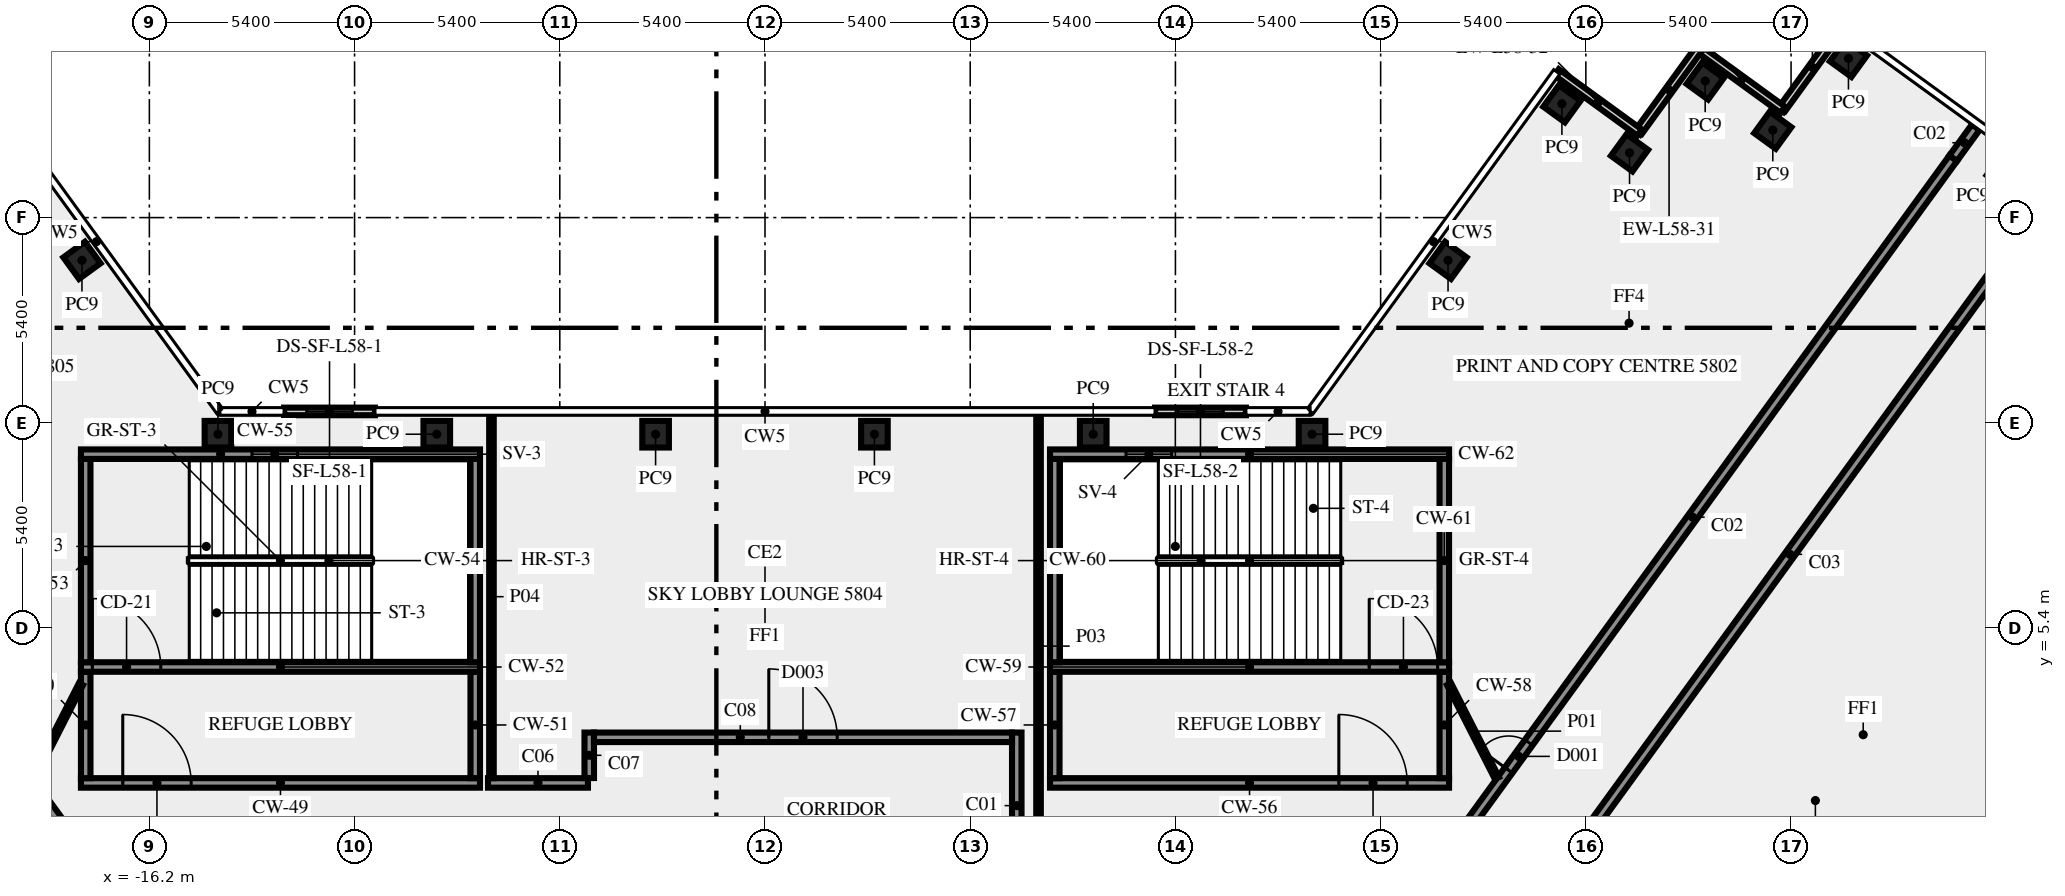
"""IFC4 building model, lengths in metres.
Left out: names, types, materials, properties, quantities, classifications, styles, units other than length and angle.
Written with IfcOpenShell. Run it as: python <this file> out.ifc"""

import sys

from ifc_helpers import new_model, si_unit, direction, frame, frame_2d, origin, origin_2d, place, context, subcontext, project, spatial, rectangle, extrude, element, fill, save


model = new_model("IFC4")
c1 = context("Model", 3, precision=1e-05, world=origin(), true_north=direction((0.0, 1.0)))
c2 = subcontext(c1, "Body", "Model", "MODEL_VIEW")
j1 = project(units=[si_unit("LENGTHUNIT", "METRE"), si_unit("PLANEANGLEUNIT", "RADIAN")], contexts=[c1])
p1 = place(None, origin())
s1 = spatial("IfcSite", under=j1, at=p1, CompositionType="ELEMENT")
p2 = place(p1, origin())
s2 = spatial("IfcBuilding", under=s1, at=p2, CompositionType="ELEMENT")
p3 = place(p2, frame((0.0, 0.0, 248.0)))
s3 = spatial("IfcBuildingStorey", under=s2, at=p3, CompositionType="ELEMENT", Elevation=248.0)
for number, where, z_axis, x_axis in (
    (1, (-17.974, 15.075, 0.0), (0.0, 0.0, 1.0), (-0.588, 0.809, 0.0)),
    (2, (28.51, 20.39, 0.0), (0.0, 0.0, 1.0), (-0.588, -0.809, 0.0)),
    (3, (26.519, 18.5, 0.0), (0.0, 0.0, 1.0), (-0.809, 0.588, 0.0)),
    (4, (24.74, 19.795, 0.0), (0.0, 0.0, 1.0), (-0.588, -0.809, 0.0)),
    (5, (22.749, 17.904, 0.0), (0.0, 0.0, 1.0), (-0.588, -0.809, 0.0)),
    (6, (20.97, 19.195, 0.0), (0.0, 0.0, 1.0), (-0.588, -0.809, 0.0)),
    (7, (17.974, 15.075, 0.0), (0.0, 0.0, 1.0), (-0.588, -0.809, 0.0)),
    (8, (14.395, 10.5, 0.0), (0.0, 0.0, 1.0), (-1.0, 0.0, 0.0)),
    (9, (8.637, 10.5, 0.0), (0.0, 0.0, 1.0), (-1.0, 0.0, 0.0)),
    (10, (2.879, 10.5, 0.0), (0.0, 0.0, 1.0), (-1.0, 0.0, 0.0)),
    (11, (-2.879, 10.5, 0.0), (0.0, 0.0, 1.0), (-1.0, 0.0, 0.0)),
    (12, (-8.637, 10.5, 0.0), (0.0, 0.0, 1.0), (-1.0, 0.0, 0.0)),
    (13, (-14.395, 10.5, 0.0), (0.0, 0.0, 1.0), (-1.0, 0.0, 0.0)),
):
    element("IfcColumn", number, at=place(p3, frame(where, z_axis=z_axis, x_axis=x_axis)), inside=s3, PredefinedType="COLUMN", context=c2, shape_type="SweptSolid", body=[
        extrude(rectangle(XDim=0.7, YDim=0.7, at=origin_2d()), origin(), (0.0, 0.0, 1.0), 4.65),
    ])
for number, where, z_axis, x_axis in (
    (14, (28.354, 21.247, 0.0), (0.0, 0.0, 1.0), (-0.588, -0.809, 0.0)),
    (15, (26.785, 19.036, 0.0), (0.0, 0.0, 1.0), (-0.809, 0.588, 0.0)),
):
    element("IfcWall", number, at=place(p3, frame(where, z_axis=z_axis, x_axis=x_axis)), inside=s3, PredefinedType="SOLIDWALL", context=c2, shape_type="SweptSolid", body=[
        extrude(rectangle(XDim=2.7, YDim=0.2, at=frame_2d((1.35, 0.0))), origin(), (0.0, 0.0, 1.0), 4.65),
    ])
for number, where, z_axis, x_axis in (
    (16, (24.583, 20.65, 0.0), (0.0, 0.0, 1.0), (-0.588, -0.809, 0.0)),
    (17, (23.013, 18.438, 0.0), (0.0, 0.0, 1.0), (-0.809, 0.588, 0.0)),
):
    element("IfcWall", number, at=place(p3, frame(where, z_axis=z_axis, x_axis=x_axis)), inside=s3, PredefinedType="SOLIDWALL", context=c2, shape_type="SweptSolid", body=[
        extrude(rectangle(XDim=2.7, YDim=0.2, at=frame_2d((1.35, 0.0))), origin(), (0.0, 0.0, 1.0), 4.65),
    ])
p4 = place(p3, frame((12.655, 11.1, 0.0), z_axis=(0.0, 0.0, 1.0), x_axis=(-1.0, 0.0, 0.0)))
e18 = element("IfcWall", 18, at=p4, inside=s3, PredefinedType="SOLIDWALL", context=c2, shape_type="SweptSolid", body=[
    extrude(rectangle(XDim=2.392, YDim=0.2, at=frame_2d((1.196, 0.0))), origin(), (0.0, 0.0, 1.0), 4.65),
])
p5 = place(p4, frame((0.596, 0.0, 1.0)))
e19 = element("IfcOpeningElement", 19, at=p5, cuts=e18, PredefinedType="OPENING", context=c2, shape_type="SweptSolid", body=[
    extrude(rectangle(XDim=1.2, YDim=1.2, at=frame_2d((0.6, 0.6))), frame((0.0, 0.11, 0.0), z_axis=(0.0, -1.0, 0.0), x_axis=(1.0, 0.0, 0.0)), (0.0, 0.0, 1.0), 0.22),
])
p6 = place(p3, frame((-10.263, 11.1, 0.0), z_axis=(0.0, 0.0, 1.0), x_axis=(-1.0, 0.0, 0.0)))
e20 = element("IfcWall", 20, at=p6, inside=s3, PredefinedType="SOLIDWALL", context=c2, shape_type="SweptSolid", body=[
    extrude(rectangle(XDim=2.392, YDim=0.2, at=frame_2d((1.196, 0.0))), origin(), (0.0, 0.0, 1.0), 4.65),
])
p7 = place(p6, frame((0.596, 0.0, 1.0)))
e21 = element("IfcOpeningElement", 21, at=p7, cuts=e20, PredefinedType="OPENING", context=c2, shape_type="SweptSolid", body=[
    extrude(rectangle(XDim=1.2, YDim=1.2, at=frame_2d((0.6, 0.6))), frame((0.0, 0.11, 0.0), z_axis=(0.0, -1.0, 0.0), x_axis=(1.0, 0.0, 0.0)), (0.0, 0.0, 1.0), 0.22),
])
p8 = place(p3, frame((-18.0, 1.325, 0.0), z_axis=(0.0, 0.0, 1.0), x_axis=(1.0, 0.0, 0.0)))
e22 = element("IfcWall", 22, at=p8, inside=s3, PredefinedType="SHEAR", context=c2, shape_type="SweptSolid", body=[
    extrude(rectangle(XDim=10.5, YDim=0.25, at=frame_2d((5.25, 0.0))), origin(), (0.0, 0.0, 1.0), 4.65),
])
p9 = place(p8, frame((1.1, 0.0, 0.0)))
e23 = element("IfcOpeningElement", 23, at=p9, cuts=e22, PredefinedType="OPENING", context=c2, shape_type="SweptSolid", body=[
    extrude(rectangle(XDim=1.8, YDim=2.1, at=frame_2d((0.9, 1.05))), frame((0.0, 0.135, 0.0), z_axis=(0.0, -1.0, 0.0), x_axis=(1.0, 0.0, 0.0)), (0.0, 0.0, 1.0), 0.27),
])
for number, where, z_axis, x_axis in (
    (24, (-17.875, 1.45, 0.0), (0.0, 0.0, 1.0), (0.0, 1.0, 0.0)),
    (25, (-7.625, 1.45, 0.0), (0.0, 0.0, 1.0), (0.0, 1.0, 0.0)),
):
    element("IfcWall", number, at=place(p3, frame(where, z_axis=z_axis, x_axis=x_axis)), inside=s3, PredefinedType="SHEAR", context=c2, shape_type="SweptSolid", body=[
        extrude(rectangle(XDim=2.8, YDim=0.25, at=frame_2d((1.4, 0.0))), origin(), (0.0, 0.0, 1.0), 4.65),
    ])
p10 = place(p3, frame((-18.0, 4.375, 0.0), z_axis=(0.0, 0.0, 1.0), x_axis=(1.0, 0.0, 0.0)))
e26 = element("IfcWall", 26, at=p10, inside=s3, PredefinedType="SHEAR", context=c2, shape_type="SweptSolid", body=[
    extrude(rectangle(XDim=10.5, YDim=0.25, at=frame_2d((5.25, 0.0))), origin(), (0.0, 0.0, 1.0), 4.65),
])
p11 = place(p10, frame((0.3, 0.0, 0.0)))
e27 = element("IfcOpeningElement", 27, at=p11, cuts=e26, PredefinedType="OPENING", context=c2, shape_type="SweptSolid", body=[
    extrude(rectangle(XDim=1.8, YDim=2.1, at=frame_2d((0.9, 1.05))), frame((0.0, 0.135, 0.0), z_axis=(0.0, -1.0, 0.0), x_axis=(1.0, 0.0, 0.0)), (0.0, 0.0, 1.0), 0.27),
])
for number, where, z_axis, x_axis in (
    (28, (-17.875, 4.5, 0.0), (0.0, 0.0, 1.0), (0.0, 1.0, 0.0)),
    (29, (-7.625, 4.5, 0.0), (0.0, 0.0, 1.0), (0.0, 1.0, 0.0)),
):
    element("IfcWall", number, at=place(p3, frame(where, z_axis=z_axis, x_axis=x_axis)), inside=s3, PredefinedType="SHEAR", context=c2, shape_type="SweptSolid", body=[
        extrude(rectangle(XDim=5.35, YDim=0.25, at=frame_2d((2.675, 0.0))), origin(), (0.0, 0.0, 1.0), 4.65),
    ])
p12 = place(p3, frame((-18.0, 9.975, 0.0), z_axis=(0.0, 0.0, 1.0), x_axis=(1.0, 0.0, 0.0)))
e30 = element("IfcWall", 30, at=p12, inside=s3, PredefinedType="SHEAR", context=c2, shape_type="SweptSolid", body=[
    extrude(rectangle(XDim=10.5, YDim=0.25, at=frame_2d((5.25, 0.0))), origin(), (0.0, 0.0, 1.0), 4.65),
])
p13 = place(p12, frame((4.5, 0.0, 1.0)))
e31 = element("IfcOpeningElement", 31, at=p13, cuts=e30, PredefinedType="OPENING", context=c2, shape_type="SweptSolid", body=[
    extrude(rectangle(XDim=1.2, YDim=1.2, at=frame_2d((0.6, 0.6))), frame((0.0, 0.135, 0.0), z_axis=(0.0, -1.0, 0.0), x_axis=(1.0, 0.0, 0.0)), (0.0, 0.0, 1.0), 0.27),
])
p14 = place(p3, frame((7.5, 1.325, 0.0), z_axis=(0.0, 0.0, 1.0), x_axis=(1.0, 0.0, 0.0)))
e32 = element("IfcWall", 32, at=p14, inside=s3, PredefinedType="SHEAR", context=c2, shape_type="SweptSolid", body=[
    extrude(rectangle(XDim=10.5, YDim=0.25, at=frame_2d((5.25, 0.0))), origin(), (0.0, 0.0, 1.0), 4.65),
])
p15 = place(p14, frame((7.6, 0.0, 0.0)))
e33 = element("IfcOpeningElement", 33, at=p15, cuts=e32, PredefinedType="OPENING", context=c2, shape_type="SweptSolid", body=[
    extrude(rectangle(XDim=1.8, YDim=2.1, at=frame_2d((0.9, 1.05))), frame((0.0, 0.135, 0.0), z_axis=(0.0, -1.0, 0.0), x_axis=(1.0, 0.0, 0.0)), (0.0, 0.0, 1.0), 0.27),
])
for number, where, z_axis, x_axis in (
    (34, (7.625, 1.45, 0.0), (0.0, 0.0, 1.0), (0.0, 1.0, 0.0)),
    (35, (17.875, 1.45, 0.0), (0.0, 0.0, 1.0), (0.0, 1.0, 0.0)),
):
    element("IfcWall", number, at=place(p3, frame(where, z_axis=z_axis, x_axis=x_axis)), inside=s3, PredefinedType="SHEAR", context=c2, shape_type="SweptSolid", body=[
        extrude(rectangle(XDim=2.8, YDim=0.25, at=frame_2d((1.4, 0.0))), origin(), (0.0, 0.0, 1.0), 4.65),
    ])
p16 = place(p3, frame((7.5, 4.375, 0.0), z_axis=(0.0, 0.0, 1.0), x_axis=(1.0, 0.0, 0.0)))
e36 = element("IfcWall", 36, at=p16, inside=s3, PredefinedType="SHEAR", context=c2, shape_type="SweptSolid", body=[
    extrude(rectangle(XDim=10.5, YDim=0.25, at=frame_2d((5.25, 0.0))), origin(), (0.0, 0.0, 1.0), 4.65),
])
p17 = place(p16, frame((8.4, 0.0, 0.0)))
e37 = element("IfcOpeningElement", 37, at=p17, cuts=e36, PredefinedType="OPENING", context=c2, shape_type="SweptSolid", body=[
    extrude(rectangle(XDim=1.8, YDim=2.1, at=frame_2d((0.9, 1.05))), frame((0.0, 0.135, 0.0), z_axis=(0.0, -1.0, 0.0), x_axis=(1.0, 0.0, 0.0)), (0.0, 0.0, 1.0), 0.27),
])
for number, where, z_axis, x_axis in (
    (38, (7.625, 4.5, 0.0), (0.0, 0.0, 1.0), (0.0, 1.0, 0.0)),
    (39, (17.875, 4.5, 0.0), (0.0, 0.0, 1.0), (0.0, 1.0, 0.0)),
):
    element("IfcWall", number, at=place(p3, frame(where, z_axis=z_axis, x_axis=x_axis)), inside=s3, PredefinedType="SHEAR", context=c2, shape_type="SweptSolid", body=[
        extrude(rectangle(XDim=5.35, YDim=0.25, at=frame_2d((2.675, 0.0))), origin(), (0.0, 0.0, 1.0), 4.65),
    ])
p18 = place(p3, frame((7.5, 9.975, 0.0), z_axis=(0.0, 0.0, 1.0), x_axis=(1.0, 0.0, 0.0)))
e40 = element("IfcWall", 40, at=p18, inside=s3, PredefinedType="SHEAR", context=c2, shape_type="SweptSolid", body=[
    extrude(rectangle(XDim=10.5, YDim=0.25, at=frame_2d((5.25, 0.0))), origin(), (0.0, 0.0, 1.0), 4.65),
])
p19 = place(p18, frame((2.0, 0.0, 1.0)))
e41 = element("IfcOpeningElement", 41, at=p19, cuts=e40, PredefinedType="OPENING", context=c2, shape_type="SweptSolid", body=[
    extrude(rectangle(XDim=1.2, YDim=1.2, at=frame_2d((0.6, 0.6))), frame((0.0, 0.135, 0.0), z_axis=(0.0, -1.0, 0.0), x_axis=(1.0, 0.0, 0.0)), (0.0, 0.0, 1.0), 0.27),
])
p20 = place(p3, frame((6.625, 2.65, 0.0), z_axis=(0.0, 0.0, 1.0), x_axis=(0.0, -1.0, 0.0)))
e42 = element("IfcWall", 42, at=p20, inside=s3, PredefinedType="SOLIDWALL", context=c2, shape_type="SweptSolid", body=[
    extrude(rectangle(XDim=3.845, YDim=0.25, at=frame_2d((1.922, 0.0))), origin(), (0.0, 0.0, 1.0), 4.65),
])
p21 = place(p3, frame((17.545, -1.125, 0.0), z_axis=(0.0, 0.0, 1.0), x_axis=(0.587787966774, 0.809015022181, 0.0)))
e43 = element("IfcWall", 43, at=p21, inside=s3, PredefinedType="SOLIDWALL", context=c2, shape_type="SweptSolid", body=[
    extrude(rectangle(XDim=23.345, YDim=0.25, at=frame_2d((11.672, 0.0))), origin(), (0.0, 0.0, 1.0), 4.65),
])
p22 = place(p21, frame((3.441, 0.0, 0.0)))
e44 = element("IfcOpeningElement", 44, at=p22, cuts=e43, PredefinedType="OPENING", context=c2, shape_type="SweptSolid", body=[
    extrude(rectangle(XDim=0.9, YDim=2.1, at=frame_2d((0.45, 1.05))), frame((0.0, 0.135, 0.0), z_axis=(0.0, -1.0, 0.0), x_axis=(1.0, 0.0, 0.0)), (0.0, 0.0, 1.0), 0.27),
])
p23 = place(p3, frame((33.41, 16.203, 0.0), z_axis=(0.0, 0.0, 1.0), x_axis=(-0.587786711753, -0.809015934013, 0.0)))
e45 = element("IfcWall", 45, at=p23, inside=s3, PredefinedType="SOLIDWALL", context=c2, shape_type="SweptSolid", body=[
    extrude(rectangle(XDim=21.911, YDim=0.25, at=frame_2d((10.956, 0.0))), origin(), (0.0, 0.0, 1.0), 4.65),
])
p24 = place(p23, frame((0.441, 0.0, 0.0)))
e46 = element("IfcOpeningElement", 46, at=p24, cuts=e45, PredefinedType="OPENING", context=c2, shape_type="SweptSolid", body=[
    extrude(rectangle(XDim=0.9, YDim=2.1, at=frame_2d((0.45, 1.05))), frame((0.0, 0.135, 0.0), z_axis=(0.0, -1.0, 0.0), x_axis=(1.0, 0.0, 0.0)), (0.0, 0.0, 1.0), 0.27),
])
p25 = place(p3, frame((-31.267, 17.762, 0.0), z_axis=(0.0, 0.0, 1.0), x_axis=(0.587787966774, -0.809015022181, 0.0)))
e47 = element("IfcWall", 47, at=p25, inside=s3, PredefinedType="SOLIDWALL", context=c2, shape_type="SweptSolid", body=[
    extrude(rectangle(XDim=23.345, YDim=0.25, at=frame_2d((11.672, 0.0))), origin(), (0.0, 0.0, 1.0), 4.65),
])
p26 = place(p25, frame((19.004, 0.0, 0.0)))
e48 = element("IfcOpeningElement", 48, at=p26, cuts=e47, PredefinedType="OPENING", context=c2, shape_type="SweptSolid", body=[
    extrude(rectangle(XDim=0.9, YDim=2.1, at=frame_2d((0.45, 1.05))), frame((0.0, 0.135, 0.0), z_axis=(0.0, -1.0, 0.0), x_axis=(1.0, 0.0, 0.0)), (0.0, 0.0, 1.0), 0.27),
])
p27 = place(p3, frame((-7.289, 1.325, 0.0), z_axis=(0.0, 0.0, 1.0), x_axis=(1.0, 0.0, 0.0)))
e49 = element("IfcWall", 49, at=p27, inside=s3, PredefinedType="SOLIDWALL", context=c2, shape_type="SweptSolid", body=[
    extrude(rectangle(XDim=2.631, YDim=0.25, at=frame_2d((1.315, 0.0))), origin(), (0.0, 0.0, 1.0), 4.65),
])
p28 = place(p3, frame((-4.625, 1.454, 0.0), z_axis=(0.0, 0.0, 1.0), x_axis=(0.0, 1.0, 0.0)))
e50 = element("IfcWall", 50, at=p28, inside=s3, PredefinedType="SOLIDWALL", context=c2, shape_type="SweptSolid", body=[
    extrude(rectangle(XDim=1.196, YDim=0.25, at=frame_2d((0.598, 0.0))), origin(), (0.0, 0.0, 1.0), 4.65),
])
p29 = place(p3, frame((-4.5, 2.525, 0.0), z_axis=(0.0, 0.0, 1.0), x_axis=(1.0, 0.0, 0.0)))
e51 = element("IfcWall", 51, at=p29, inside=s3, PredefinedType="SOLIDWALL", context=c2, shape_type="SweptSolid", body=[
    extrude(rectangle(XDim=11.0, YDim=0.25, at=frame_2d((5.5, 0.0))), origin(), (0.0, 0.0, 1.0), 4.65),
])
p30 = place(p29, frame((4.6, 0.0, 0.0)))
e52 = element("IfcOpeningElement", 52, at=p30, cuts=e51, PredefinedType="OPENING", context=c2, shape_type="SweptSolid", body=[
    extrude(rectangle(XDim=1.8, YDim=2.1, at=frame_2d((0.9, 1.05))), frame((0.0, 0.135, 0.0), z_axis=(0.0, -1.0, 0.0), x_axis=(1.0, 0.0, 0.0)), (0.0, 0.0, 1.0), 0.27),
])
for number, where, z_axis, x_axis in (
    (53, (18.0, 3.925, 0.0), (0.0, 0.0, 1.0), (0.454, -0.891, 0.0)),
    (54, (-19.261, 1.45, 0.0), (0.0, 0.0, 1.0), (0.454, 0.891, 0.0)),
):
    element("IfcWall", number, at=place(p3, frame(where, z_axis=z_axis, x_axis=x_axis)), inside=s3, PredefinedType="PARTITIONING", context=c2, shape_type="SweptSolid", body=[
        extrude(rectangle(XDim=2.778, YDim=0.12, at=frame_2d((1.389, 0.0))), origin(), (0.0, 0.0, 1.0), 4.65),
    ])
p31 = place(p3, frame((7.198, -1.15, 0.0), z_axis=(0.0, 0.0, 1.0), x_axis=(0.0, 1.0, 0.0)))
e55 = element("IfcWall", 55, at=p31, inside=s3, PredefinedType="PARTITIONING", context=c2, shape_type="SweptSolid", body=[
    extrude(rectangle(XDim=12.15, YDim=0.12, at=frame_2d((6.075, 0.0))), origin(), (0.0, 0.0, 1.0), 3.95),
])
p32 = place(p3, frame((-7.198, 11.0, 0.0), z_axis=(0.0, 0.0, 1.0), x_axis=(0.0, -1.0, 0.0)))
e56 = element("IfcWall", 56, at=p32, inside=s3, PredefinedType="PARTITIONING", context=c2, shape_type="SweptSolid", body=[
    extrude(rectangle(XDim=9.55, YDim=0.12, at=frame_2d((4.775, 0.0))), origin(), (0.0, 0.0, 1.0), 3.95),
])
p33 = place(p3, frame((31.267, 17.762, 0.0), z_axis=(0.0, 0.0, 1.0), x_axis=(0.587840411638, 0.808976915892, 0.0)))
e57 = element("IfcWall", 57, at=p33, inside=s3, PredefinedType="SOLIDWALL", context=c2, shape_type="SweptSolid", body=[
    extrude(rectangle(XDim=1.008, YDim=0.25, at=frame_2d((0.504, 0.0))), origin(), (0.0, 0.0, 1.0), 3.95),
])
p34 = place(p5, origin())
e58 = element("IfcWindow", 58, at=p34, inside=s3, PartitioningType="SINGLE_PANEL", PredefinedType="WINDOW", context=c2, shape_type="SweptSolid", body=[
    extrude(rectangle(XDim=1.2, YDim=1.2, at=frame_2d((0.6, 0.6))), frame((0.0, 0.03, 0.0), z_axis=(0.0, -1.0, 0.0), x_axis=(1.0, 0.0, 0.0)), (0.0, 0.0, 1.0), 0.06),
])
fill(e19, e58)
p35 = place(p7, origin())
e59 = element("IfcWindow", 59, at=p35, inside=s3, PartitioningType="SINGLE_PANEL", PredefinedType="WINDOW", context=c2, shape_type="SweptSolid", body=[
    extrude(rectangle(XDim=1.2, YDim=1.2, at=frame_2d((0.6, 0.6))), frame((0.0, 0.03, 0.0), z_axis=(0.0, -1.0, 0.0), x_axis=(1.0, 0.0, 0.0)), (0.0, 0.0, 1.0), 0.06),
])
fill(e21, e59)
p36 = place(p9, origin())
e60 = element("IfcDoor", 60, at=p36, inside=s3, OperationType="DOUBLE_DOOR_SINGLE_SWING", PredefinedType="DOOR", context=c2, shape_type="SweptSolid", body=[
    extrude(rectangle(XDim=1.8, YDim=2.1, at=frame_2d((0.9, 1.05))), frame((0.0, 0.025, 0.0), z_axis=(0.0, -1.0, 0.0), x_axis=(1.0, 0.0, 0.0)), (0.0, 0.0, 1.0), 0.05),
])
fill(e23, e60)
p37 = place(p11, origin())
e61 = element("IfcDoor", 61, at=p37, inside=s3, OperationType="DOUBLE_DOOR_SINGLE_SWING", PredefinedType="DOOR", context=c2, shape_type="SweptSolid", body=[
    extrude(rectangle(XDim=1.8, YDim=2.1, at=frame_2d((0.9, 1.05))), frame((0.0, 0.025, 0.0), z_axis=(0.0, -1.0, 0.0), x_axis=(1.0, 0.0, 0.0)), (0.0, 0.0, 1.0), 0.05),
])
fill(e27, e61)
p38 = place(p13, origin())
e62 = element("IfcWindow", 62, at=p38, inside=s3, PartitioningType="SINGLE_PANEL", PredefinedType="WINDOW", context=c2, shape_type="SweptSolid", body=[
    extrude(rectangle(XDim=1.2, YDim=1.2, at=frame_2d((0.6, 0.6))), frame((0.0, 0.03, 0.0), z_axis=(0.0, -1.0, 0.0), x_axis=(1.0, 0.0, 0.0)), (0.0, 0.0, 1.0), 0.06),
])
fill(e31, e62)
p39 = place(p15, origin())
e63 = element("IfcDoor", 63, at=p39, inside=s3, OperationType="DOUBLE_DOOR_SINGLE_SWING", PredefinedType="DOOR", context=c2, shape_type="SweptSolid", body=[
    extrude(rectangle(XDim=1.8, YDim=2.1, at=frame_2d((0.9, 1.05))), frame((0.0, 0.025, 0.0), z_axis=(0.0, -1.0, 0.0), x_axis=(1.0, 0.0, 0.0)), (0.0, 0.0, 1.0), 0.05),
])
fill(e33, e63)
p40 = place(p17, origin())
e64 = element("IfcDoor", 64, at=p40, inside=s3, OperationType="DOUBLE_DOOR_SINGLE_SWING", PredefinedType="DOOR", context=c2, shape_type="SweptSolid", body=[
    extrude(rectangle(XDim=1.8, YDim=2.1, at=frame_2d((0.9, 1.05))), frame((0.0, 0.025, 0.0), z_axis=(0.0, -1.0, 0.0), x_axis=(1.0, 0.0, 0.0)), (0.0, 0.0, 1.0), 0.05),
])
fill(e37, e64)
p41 = place(p19, origin())
e65 = element("IfcWindow", 65, at=p41, inside=s3, PartitioningType="SINGLE_PANEL", PredefinedType="WINDOW", context=c2, shape_type="SweptSolid", body=[
    extrude(rectangle(XDim=1.2, YDim=1.2, at=frame_2d((0.6, 0.6))), frame((0.0, 0.03, 0.0), z_axis=(0.0, -1.0, 0.0), x_axis=(1.0, 0.0, 0.0)), (0.0, 0.0, 1.0), 0.06),
])
fill(e41, e65)
p42 = place(p22, origin())
e66 = element("IfcDoor", 66, at=p42, inside=s3, OperationType="SINGLE_SWING_LEFT", PredefinedType="DOOR", context=c2, shape_type="SweptSolid", body=[
    extrude(rectangle(XDim=0.9, YDim=2.1, at=frame_2d((0.45, 1.05))), frame((0.0, 0.025, 0.0), z_axis=(0.0, -1.0, 0.0), x_axis=(1.0, 0.0, 0.0)), (0.0, 0.0, 1.0), 0.05),
])
fill(e44, e66)
p43 = place(p30, origin())
e67 = element("IfcDoor", 67, at=p43, inside=s3, OperationType="DOUBLE_DOOR_SINGLE_SWING", PredefinedType="DOOR", context=c2, shape_type="SweptSolid", body=[
    extrude(rectangle(XDim=1.8, YDim=2.1, at=frame_2d((0.9, 1.05))), frame((0.0, 0.025, 0.0), z_axis=(0.0, -1.0, 0.0), x_axis=(1.0, 0.0, 0.0)), (0.0, 0.0, 1.0), 0.05),
])
fill(e52, e67)
save(model, sys.argv[1])
